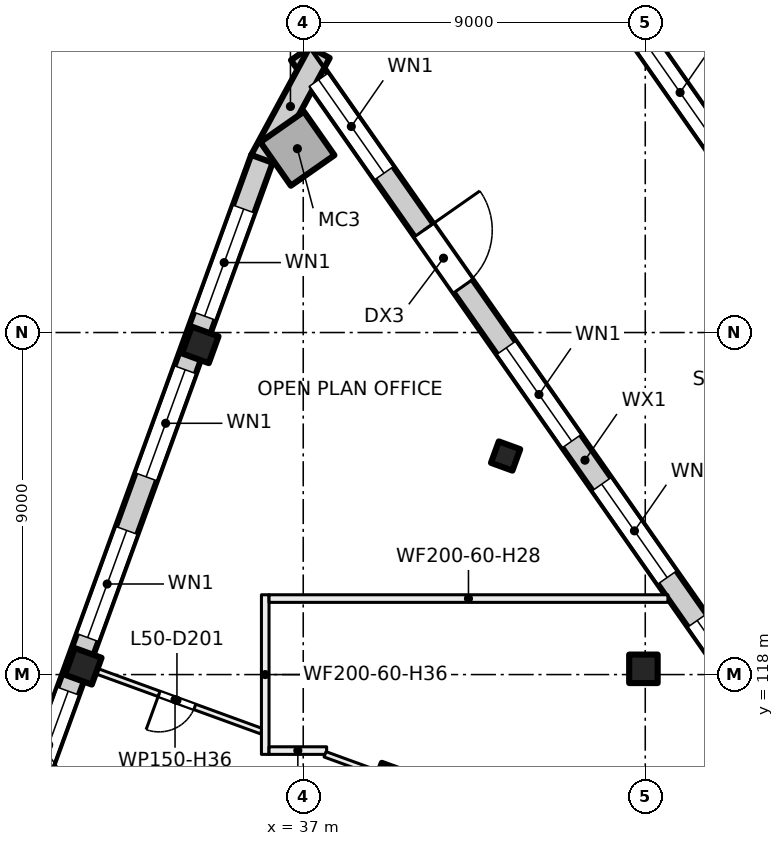
"""IFC4 building model, lengths in metres.
Left out: names, types, materials, properties, quantities, classifications, styles, units other than length and angle.
Written with IfcOpenShell. Run it as: python <this file> out.ifc"""

import sys

from ifc_helpers import new_model, si_unit, direction, frame, frame_2d, origin, origin_2d, place, context, subcontext, project, spatial, rectangle, hollow_rectangle, extrude, element, fill, save


model = new_model("IFC4")
c1 = context("Model", 3, precision=1e-05, world=origin(), true_north=direction((0.0, 1.0)))
c2 = subcontext(c1, "Body", "Model", "MODEL_VIEW")
j1 = project(units=[si_unit("LENGTHUNIT", "METRE"), si_unit("PLANEANGLEUNIT", "RADIAN")], contexts=[c1])
p1 = place(None, origin())
s1 = spatial("IfcSite", under=j1, at=p1, CompositionType="ELEMENT")
p2 = place(p1, origin())
s2 = spatial("IfcBuilding", under=s1, at=p2, CompositionType="ELEMENT")
p3 = place(p2, frame((0.0, 0.0, 212.0)))
s3 = spatial("IfcBuildingStorey", under=s2, at=p3, CompositionType="ELEMENT", Elevation=212.0)
p4 = place(p3, frame((36.846, 131.838, 0.0), z_axis=(0.0, 0.0, 1.0), x_axis=(0.573576436351, -0.819152044289, 0.0)))
e1 = element("IfcColumn", 1, at=p4, inside=s3, PredefinedType="COLUMN", context=c2, shape_type="SweptSolid", body=[
    extrude(hollow_rectangle(XDim=1.4, YDim=1.4, WallThickness=0.032, at=origin_2d()), origin(), (0.0, 0.0, 1.0), 4.0),
])
p5 = place(p3, frame((45.952, 118.152, 0.0), z_axis=(0.0, 0.0, 1.0), x_axis=(1.0, 0.0, 0.0)))
e2 = element("IfcColumn", 2, at=p5, inside=s3, PredefinedType="COLUMN", context=c2, shape_type="SweptSolid", body=[
    extrude(rectangle(XDim=0.75, YDim=0.75, at=origin_2d()), origin(), (0.0, 0.0, 1.0), 4.0),
])
for number, where, z_axis, x_axis in (
    (3, (42.325, 123.751, 0.0), (0.0, 0.0, 1.0), (-0.342, -0.94, 0.0)),
    (4, (39.247, 115.293, 0.0), (0.0, 0.0, 1.0), (-0.342, -0.94, 0.0)),
):
    element("IfcColumn", number, at=place(p3, frame(where, z_axis=z_axis, x_axis=x_axis)), inside=s3, PredefinedType="COLUMN", context=c2, shape_type="SweptSolid", body=[
        extrude(rectangle(XDim=0.6, YDim=0.6, at=origin_2d()), origin(), (0.0, 0.0, 1.0), 4.0),
    ])
for number, where, z_axis, x_axis in (
    (5, (34.291, 126.675, 0.0), (0.0, 0.0, 1.0), (-0.342, -0.94, 0.0)),
    (6, (31.212, 118.218, 0.0), (0.0, 0.0, 1.0), (-0.342, -0.94, 0.0)),
):
    element("IfcColumn", number, at=place(p3, frame(where, z_axis=z_axis, x_axis=x_axis)), inside=s3, PredefinedType="COLUMN", context=c2, shape_type="SweptSolid", body=[
        extrude(rectangle(XDim=0.75, YDim=0.75, at=origin_2d()), origin(), (0.0, 0.0, 1.0), 4.0),
    ])
p6 = place(p3, frame((58.083, 117.369, 0.0), z_axis=(0.0, 0.0, 1.0), x_axis=(-0.573573095716, 0.819154383416, 0.0)))
e7 = element("IfcWall", 7, at=p6, inside=s3, PredefinedType="SOLIDWALL", context=c2, shape_type="SweptSolid", body=[
    extrude(rectangle(XDim=26.037, YDim=0.6, at=frame_2d((13.019, 0.0))), origin(), (0.0, 0.0, 1.0), 3.625),
])
p7 = place(p6, frame((1.05, 0.0, 0.0)))
e8 = element("IfcOpeningElement", 8, at=p7, cuts=e7, PredefinedType="OPENING", context=c2, shape_type="SweptSolid", body=[
    extrude(rectangle(XDim=1.8, YDim=2.4, at=frame_2d((0.9, 1.2))), frame((0.0, 0.31, 0.0), z_axis=(0.0, -1.0, 0.0), x_axis=(1.0, 0.0, 0.0)), (0.0, 0.0, 1.0), 0.62),
])
p8 = place(p6, frame((4.829, 0.0, 0.9)))
e9 = element("IfcOpeningElement", 9, at=p8, cuts=e7, PredefinedType="OPENING", context=c2, shape_type="SweptSolid", body=[
    extrude(rectangle(XDim=3.0, YDim=2.4, at=frame_2d((1.5, 1.2))), frame((0.0, 0.31, 0.0), z_axis=(0.0, -1.0, 0.0), x_axis=(1.0, 0.0, 0.0)), (0.0, 0.0, 1.0), 0.62),
])
p9 = place(p6, frame((9.209, 0.0, 0.9)))
e10 = element("IfcOpeningElement", 10, at=p9, cuts=e7, PredefinedType="OPENING", context=c2, shape_type="SweptSolid", body=[
    extrude(rectangle(XDim=3.0, YDim=2.4, at=frame_2d((1.5, 1.2))), frame((0.0, 0.31, 0.0), z_axis=(0.0, -1.0, 0.0), x_axis=(1.0, 0.0, 0.0)), (0.0, 0.0, 1.0), 0.62),
])
p10 = place(p6, frame((13.588, 0.0, 0.9)))
e11 = element("IfcOpeningElement", 11, at=p10, cuts=e7, PredefinedType="OPENING", context=c2, shape_type="SweptSolid", body=[
    extrude(rectangle(XDim=3.0, YDim=2.4, at=frame_2d((1.5, 1.2))), frame((0.0, 0.31, 0.0), z_axis=(0.0, -1.0, 0.0), x_axis=(1.0, 0.0, 0.0)), (0.0, 0.0, 1.0), 0.62),
])
p11 = place(p6, frame((17.968, 0.0, 0.9)))
e12 = element("IfcOpeningElement", 12, at=p11, cuts=e7, PredefinedType="OPENING", context=c2, shape_type="SweptSolid", body=[
    extrude(rectangle(XDim=3.0, YDim=2.4, at=frame_2d((1.5, 1.2))), frame((0.0, 0.31, 0.0), z_axis=(0.0, -1.0, 0.0), x_axis=(1.0, 0.0, 0.0)), (0.0, 0.0, 1.0), 0.62),
])
p12 = place(p6, frame((22.198, 0.0, 0.9)))
e13 = element("IfcOpeningElement", 13, at=p12, cuts=e7, PredefinedType="OPENING", context=c2, shape_type="SweptSolid", body=[
    extrude(rectangle(XDim=3.0, YDim=2.4, at=frame_2d((1.5, 1.2))), frame((0.0, 0.31, 0.0), z_axis=(0.0, -1.0, 0.0), x_axis=(1.0, 0.0, 0.0)), (0.0, 0.0, 1.0), 0.62),
])
p13 = place(p3, frame((36.923, 134.338, 0.0), z_axis=(0.0, 0.0, 1.0), x_axis=(0.573575266068, -0.819152863729, 0.0)))
e14 = element("IfcWall", 14, at=p13, inside=s3, PredefinedType="SOLIDWALL", context=c2, shape_type="SweptSolid", body=[
    extrude(rectangle(XDim=26.117, YDim=0.6, at=frame_2d((13.059, 0.0))), origin(), (0.0, 0.0, 1.0), 3.625),
])
p14 = place(p13, frame((0.84, 0.0, 0.9)))
e15 = element("IfcOpeningElement", 15, at=p14, cuts=e14, PredefinedType="OPENING", context=c2, shape_type="SweptSolid", body=[
    extrude(rectangle(XDim=3.0, YDim=2.4, at=frame_2d((1.5, 1.2))), frame((0.0, 0.31, 0.0), z_axis=(0.0, -1.0, 0.0), x_axis=(1.0, 0.0, 0.0)), (0.0, 0.0, 1.0), 0.62),
])
p15 = place(p13, frame((5.669, 0.0, 0.0)))
e16 = element("IfcOpeningElement", 16, at=p15, cuts=e14, PredefinedType="OPENING", context=c2, shape_type="SweptSolid", body=[
    extrude(rectangle(XDim=1.8, YDim=2.4, at=frame_2d((0.9, 1.2))), frame((0.0, 0.31, 0.0), z_axis=(0.0, -1.0, 0.0), x_axis=(1.0, 0.0, 0.0)), (0.0, 0.0, 1.0), 0.62),
])
p16 = place(p13, frame((9.449, 0.0, 0.9)))
e17 = element("IfcOpeningElement", 17, at=p16, cuts=e14, PredefinedType="OPENING", context=c2, shape_type="SweptSolid", body=[
    extrude(rectangle(XDim=3.0, YDim=2.4, at=frame_2d((1.5, 1.2))), frame((0.0, 0.31, 0.0), z_axis=(0.0, -1.0, 0.0), x_axis=(1.0, 0.0, 0.0)), (0.0, 0.0, 1.0), 0.62),
])
p17 = place(p13, frame((13.829, 0.0, 0.9)))
e18 = element("IfcOpeningElement", 18, at=p17, cuts=e14, PredefinedType="OPENING", context=c2, shape_type="SweptSolid", body=[
    extrude(rectangle(XDim=3.0, YDim=2.4, at=frame_2d((1.5, 1.2))), frame((0.0, 0.31, 0.0), z_axis=(0.0, -1.0, 0.0), x_axis=(1.0, 0.0, 0.0)), (0.0, 0.0, 1.0), 0.62),
])
p18 = place(p13, frame((18.208, 0.0, 0.9)))
e19 = element("IfcOpeningElement", 19, at=p18, cuts=e14, PredefinedType="OPENING", context=c2, shape_type="SweptSolid", body=[
    extrude(rectangle(XDim=3.0, YDim=2.4, at=frame_2d((1.5, 1.2))), frame((0.0, 0.31, 0.0), z_axis=(0.0, -1.0, 0.0), x_axis=(1.0, 0.0, 0.0)), (0.0, 0.0, 1.0), 0.62),
])
p19 = place(p13, frame((22.438, 0.0, 0.9)))
e20 = element("IfcOpeningElement", 20, at=p19, cuts=e14, PredefinedType="OPENING", context=c2, shape_type="SweptSolid", body=[
    extrude(rectangle(XDim=3.0, YDim=2.4, at=frame_2d((1.5, 1.2))), frame((0.0, 0.31, 0.0), z_axis=(0.0, -1.0, 0.0), x_axis=(1.0, 0.0, 0.0)), (0.0, 0.0, 1.0), 0.62),
])
p20 = place(p3, frame((35.895, 131.53, 0.0), z_axis=(0.0, 0.0, 1.0), x_axis=(0.476529237666, 0.879158623713, 0.0)))
e21 = element("IfcWall", 21, at=p20, inside=s3, PredefinedType="SOLIDWALL", context=c2, shape_type="SweptSolid", body=[
    extrude(rectangle(XDim=3.228, YDim=0.6, at=frame_2d((1.614, 0.0))), origin(), (0.0, 0.0, 1.0), 3.625),
])
p21 = place(p3, frame((24.666, 100.669, 0.0), z_axis=(0.0, 0.0, 1.0), x_axis=(0.34201964167, 0.939692803373, 0.0)))
e22 = element("IfcWall", 22, at=p21, inside=s3, PredefinedType="SOLIDWALL", context=c2, shape_type="SweptSolid", body=[
    extrude(rectangle(XDim=32.884, YDim=0.6, at=frame_2d((16.442, 0.0))), origin(), (0.0, 0.0, 1.0), 3.625),
])
p22 = place(p21, frame((1.48, 0.0, 0.9)))
e23 = element("IfcOpeningElement", 23, at=p22, cuts=e22, PredefinedType="OPENING", context=c2, shape_type="SweptSolid", body=[
    extrude(rectangle(XDim=3.0, YDim=2.4, at=frame_2d((1.5, 1.2))), frame((0.0, 0.31, 0.0), z_axis=(0.0, -1.0, 0.0), x_axis=(1.0, 0.0, 0.0)), (0.0, 0.0, 1.0), 0.62),
])
p23 = place(p21, frame((5.98, 0.0, 0.9)))
e24 = element("IfcOpeningElement", 24, at=p23, cuts=e22, PredefinedType="OPENING", context=c2, shape_type="SweptSolid", body=[
    extrude(rectangle(XDim=3.0, YDim=2.4, at=frame_2d((1.5, 1.2))), frame((0.0, 0.31, 0.0), z_axis=(0.0, -1.0, 0.0), x_axis=(1.0, 0.0, 0.0)), (0.0, 0.0, 1.0), 0.62),
])
p24 = place(p21, frame((10.48, 0.0, 0.9)))
e25 = element("IfcOpeningElement", 25, at=p24, cuts=e22, PredefinedType="OPENING", context=c2, shape_type="SweptSolid", body=[
    extrude(rectangle(XDim=3.0, YDim=2.4, at=frame_2d((1.5, 1.2))), frame((0.0, 0.31, 0.0), z_axis=(0.0, -1.0, 0.0), x_axis=(1.0, 0.0, 0.0)), (0.0, 0.0, 1.0), 0.62),
])
p25 = place(p21, frame((14.98, 0.0, 0.9)))
e26 = element("IfcOpeningElement", 26, at=p25, cuts=e22, PredefinedType="OPENING", context=c2, shape_type="SweptSolid", body=[
    extrude(rectangle(XDim=3.0, YDim=2.4, at=frame_2d((1.5, 1.2))), frame((0.0, 0.31, 0.0), z_axis=(0.0, -1.0, 0.0), x_axis=(1.0, 0.0, 0.0)), (0.0, 0.0, 1.0), 0.62),
])
p26 = place(p21, frame((19.48, 0.0, 0.9)))
e27 = element("IfcOpeningElement", 27, at=p26, cuts=e22, PredefinedType="OPENING", context=c2, shape_type="SweptSolid", body=[
    extrude(rectangle(XDim=3.0, YDim=2.4, at=frame_2d((1.5, 1.2))), frame((0.0, 0.31, 0.0), z_axis=(0.0, -1.0, 0.0), x_axis=(1.0, 0.0, 0.0)), (0.0, 0.0, 1.0), 0.62),
])
p27 = place(p21, frame((23.98, 0.0, 0.9)))
e28 = element("IfcOpeningElement", 28, at=p27, cuts=e22, PredefinedType="OPENING", context=c2, shape_type="SweptSolid", body=[
    extrude(rectangle(XDim=3.0, YDim=2.4, at=frame_2d((1.5, 1.2))), frame((0.0, 0.31, 0.0), z_axis=(0.0, -1.0, 0.0), x_axis=(1.0, 0.0, 0.0)), (0.0, 0.0, 1.0), 0.62),
])
p28 = place(p21, frame((28.48, 0.0, 0.9)))
e29 = element("IfcOpeningElement", 29, at=p28, cuts=e22, PredefinedType="OPENING", context=c2, shape_type="SweptSolid", body=[
    extrude(rectangle(XDim=3.0, YDim=2.4, at=frame_2d((1.5, 1.2))), frame((0.0, 0.31, 0.0), z_axis=(0.0, -1.0, 0.0), x_axis=(1.0, 0.0, 0.0)), (0.0, 0.0, 1.0), 0.62),
])
p29 = place(p3, frame((35.9, 116.511, 0.0), z_axis=(0.0, 0.0, 1.0), x_axis=(-0.939620956464, 0.342216975284, 0.0)))
e30 = element("IfcWall", 30, at=p29, inside=s3, PredefinedType="PARTITIONING", context=c2, shape_type="SweptSolid", body=[
    extrude(rectangle(XDim=4.839, YDim=0.15, at=frame_2d((2.419, 0.0))), origin(), (0.0, 0.0, 1.0), 3.625),
])
p30 = place(p29, frame((1.866, 0.0, 0.0)))
e31 = element("IfcOpeningElement", 31, at=p30, cuts=e30, PredefinedType="OPENING", context=c2, shape_type="SweptSolid", body=[
    extrude(rectangle(XDim=1.0, YDim=2.1, at=frame_2d((0.5, 1.05))), frame((0.0, 0.085, 0.0), z_axis=(0.0, -1.0, 0.0), x_axis=(1.0, 0.0, 0.0)), (0.0, 0.0, 1.0), 0.17),
])
p31 = place(p3, frame((36.0, 115.9, 0.0), z_axis=(0.0, 0.0, 1.0), x_axis=(0.0, 1.0, 0.0)))
e32 = element("IfcWall", 32, at=p31, inside=s3, PredefinedType="PARTITIONING", context=c2, shape_type="SweptSolid", body=[
    extrude(rectangle(XDim=4.2, YDim=0.2, at=frame_2d((2.1, 0.0))), origin(), (0.0, 0.0, 1.0), 3.625),
])
p32 = place(p3, frame((36.1, 116.0, 0.0), z_axis=(0.0, 0.0, 1.0), x_axis=(1.0, 0.0, 0.0)))
e33 = element("IfcWall", 33, at=p32, inside=s3, PredefinedType="PARTITIONING", context=c2, shape_type="SweptSolid", body=[
    extrude(rectangle(XDim=1.516, YDim=0.2, at=frame_2d((0.758, 0.0))), origin(), (0.0, 0.0, 1.0), 3.625),
])
p33 = place(p3, frame((36.1, 120.0, 0.0), z_axis=(0.0, 0.0, 1.0), x_axis=(1.0, 0.0, 0.0)))
e34 = element("IfcWall", 34, at=p33, inside=s3, PredefinedType="PARTITIONING", context=c2, shape_type="SweptSolid", body=[
    extrude(rectangle(XDim=10.496, YDim=0.2, at=frame_2d((5.248, 0.0))), origin(), (0.0, 0.0, 1.0), 2.825),
])
p34 = place(p3, frame((37.574, 115.902, 0.0), z_axis=(0.0, 0.0, 1.0), x_axis=(0.939688414098, -0.342031700883, 0.0)))
e35 = element("IfcWall", 35, at=p34, inside=s3, PredefinedType="PARTITIONING", context=c2, shape_type="SweptSolid", body=[
    extrude(rectangle(XDim=11.681, YDim=0.15, at=frame_2d((5.84, 0.0))), origin(), (0.0, 0.0, 1.0), 3.625),
])
p35 = place(p11, origin())
e36 = element("IfcWindow", 36, at=p35, inside=s3, PartitioningType="SINGLE_PANEL", PredefinedType="WINDOW", context=c2, shape_type="SweptSolid", body=[
    extrude(rectangle(XDim=3.0, YDim=2.4, at=frame_2d((1.5, 1.2))), frame((0.0, 0.03, 0.0), z_axis=(0.0, -1.0, 0.0), x_axis=(1.0, 0.0, 0.0)), (0.0, 0.0, 1.0), 0.06),
])
fill(e12, e36)
p36 = place(p14, origin())
e37 = element("IfcWindow", 37, at=p36, inside=s3, PartitioningType="SINGLE_PANEL", PredefinedType="WINDOW", context=c2, shape_type="SweptSolid", body=[
    extrude(rectangle(XDim=3.0, YDim=2.4, at=frame_2d((1.5, 1.2))), frame((0.0, 0.03, 0.0), z_axis=(0.0, -1.0, 0.0), x_axis=(1.0, 0.0, 0.0)), (0.0, 0.0, 1.0), 0.06),
])
fill(e15, e37)
p37 = place(p15, origin())
e38 = element("IfcDoor", 38, at=p37, inside=s3, OperationType="DOUBLE_DOOR_SINGLE_SWING", PredefinedType="DOOR", context=c2, shape_type="SweptSolid", body=[
    extrude(rectangle(XDim=1.8, YDim=2.4, at=frame_2d((0.9, 1.2))), frame((0.0, 0.025, 0.0), z_axis=(0.0, -1.0, 0.0), x_axis=(1.0, 0.0, 0.0)), (0.0, 0.0, 1.0), 0.05),
])
fill(e16, e38)
p38 = place(p16, origin())
e39 = element("IfcWindow", 39, at=p38, inside=s3, PartitioningType="SINGLE_PANEL", PredefinedType="WINDOW", context=c2, shape_type="SweptSolid", body=[
    extrude(rectangle(XDim=3.0, YDim=2.4, at=frame_2d((1.5, 1.2))), frame((0.0, 0.03, 0.0), z_axis=(0.0, -1.0, 0.0), x_axis=(1.0, 0.0, 0.0)), (0.0, 0.0, 1.0), 0.06),
])
fill(e17, e39)
p39 = place(p17, origin())
e40 = element("IfcWindow", 40, at=p39, inside=s3, PartitioningType="SINGLE_PANEL", PredefinedType="WINDOW", context=c2, shape_type="SweptSolid", body=[
    extrude(rectangle(XDim=3.0, YDim=2.4, at=frame_2d((1.5, 1.2))), frame((0.0, 0.03, 0.0), z_axis=(0.0, -1.0, 0.0), x_axis=(1.0, 0.0, 0.0)), (0.0, 0.0, 1.0), 0.06),
])
fill(e18, e40)
p40 = place(p18, origin())
e41 = element("IfcWindow", 41, at=p40, inside=s3, PartitioningType="SINGLE_PANEL", PredefinedType="WINDOW", context=c2, shape_type="SweptSolid", body=[
    extrude(rectangle(XDim=3.0, YDim=2.4, at=frame_2d((1.5, 1.2))), frame((0.0, 0.03, 0.0), z_axis=(0.0, -1.0, 0.0), x_axis=(1.0, 0.0, 0.0)), (0.0, 0.0, 1.0), 0.06),
])
fill(e19, e41)
p41 = place(p25, origin())
e42 = element("IfcWindow", 42, at=p41, inside=s3, PartitioningType="SINGLE_PANEL", PredefinedType="WINDOW", context=c2, shape_type="SweptSolid", body=[
    extrude(rectangle(XDim=3.0, YDim=2.4, at=frame_2d((1.5, 1.2))), frame((0.0, 0.03, 0.0), z_axis=(0.0, -1.0, 0.0), x_axis=(1.0, 0.0, 0.0)), (0.0, 0.0, 1.0), 0.06),
])
fill(e26, e42)
p42 = place(p26, origin())
e43 = element("IfcWindow", 43, at=p42, inside=s3, PartitioningType="SINGLE_PANEL", PredefinedType="WINDOW", context=c2, shape_type="SweptSolid", body=[
    extrude(rectangle(XDim=3.0, YDim=2.4, at=frame_2d((1.5, 1.2))), frame((0.0, 0.03, 0.0), z_axis=(0.0, -1.0, 0.0), x_axis=(1.0, 0.0, 0.0)), (0.0, 0.0, 1.0), 0.06),
])
fill(e27, e43)
p43 = place(p27, origin())
e44 = element("IfcWindow", 44, at=p43, inside=s3, PartitioningType="SINGLE_PANEL", PredefinedType="WINDOW", context=c2, shape_type="SweptSolid", body=[
    extrude(rectangle(XDim=3.0, YDim=2.4, at=frame_2d((1.5, 1.2))), frame((0.0, 0.03, 0.0), z_axis=(0.0, -1.0, 0.0), x_axis=(1.0, 0.0, 0.0)), (0.0, 0.0, 1.0), 0.06),
])
fill(e28, e44)
p44 = place(p28, origin())
e45 = element("IfcWindow", 45, at=p44, inside=s3, PartitioningType="SINGLE_PANEL", PredefinedType="WINDOW", context=c2, shape_type="SweptSolid", body=[
    extrude(rectangle(XDim=3.0, YDim=2.4, at=frame_2d((1.5, 1.2))), frame((0.0, 0.03, 0.0), z_axis=(0.0, -1.0, 0.0), x_axis=(1.0, 0.0, 0.0)), (0.0, 0.0, 1.0), 0.06),
])
fill(e29, e45)
p45 = place(p30, origin())
e46 = element("IfcDoor", 46, at=p45, inside=s3, OperationType="SINGLE_SWING_RIGHT", PredefinedType="DOOR", context=c2, shape_type="SweptSolid", body=[
    extrude(rectangle(XDim=1.0, YDim=2.1, at=frame_2d((0.5, 1.05))), frame((0.0, 0.025, 0.0), z_axis=(0.0, -1.0, 0.0), x_axis=(1.0, 0.0, 0.0)), (0.0, 0.0, 1.0), 0.05),
])
fill(e31, e46)
save(model, sys.argv[1])
